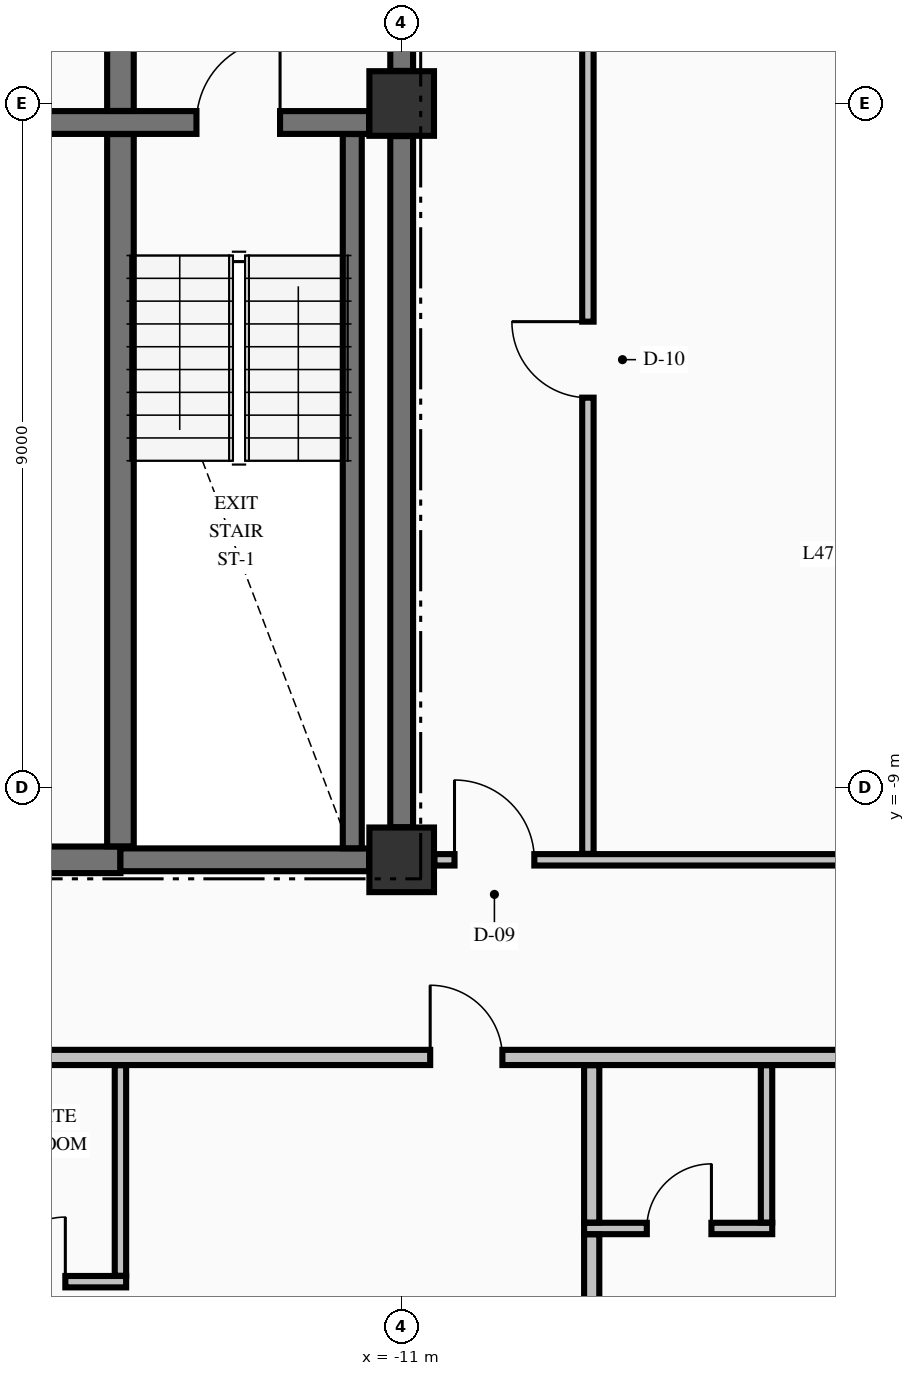
"""IFC4 building model, lengths in metres.
Left out: names, types, materials, properties, quantities, classifications, styles, units other than length and angle.
Written with IfcOpenShell. Run it as: python <this file> out.ifc"""

import sys

from ifc_helpers import new_model, si_unit, direction, frame, frame_2d, origin, origin_2d, place, context, subcontext, project, spatial, rectangle, extrude, element, fill, save


model = new_model("IFC4")
c1 = context("Model", 3, precision=1e-05, world=origin(), true_north=direction((0.0, 1.0)))
c2 = subcontext(c1, "Body", "Model", "MODEL_VIEW")
j1 = project(units=[si_unit("LENGTHUNIT", "METRE"), si_unit("PLANEANGLEUNIT", "RADIAN")], contexts=[c1])
p1 = place(None, origin())
s1 = spatial("IfcSite", under=j1, at=p1, CompositionType="ELEMENT")
p2 = place(p1, origin())
s2 = spatial("IfcBuilding", under=s1, at=p2, CompositionType="ELEMENT")
p3 = place(p2, frame((0.0, 0.0, 183.06)))
s3 = spatial("IfcBuildingStorey", under=s2, at=p3, CompositionType="ELEMENT", Elevation=183.06)
for number, where, z_axis, x_axis in (
    (1, (-11.0, -9.95, -0.25), (0.0, 0.0, 1.0), (1.0, 0.0, 0.0)),
    (2, (-11.0, 0.0, -0.25), (0.0, 0.0, 1.0), (1.0, 0.0, 0.0)),
):
    element("IfcColumn", number, at=place(p3, frame(where, z_axis=z_axis, x_axis=x_axis)), inside=s3, PredefinedType="COLUMN", context=c2, shape_type="SweptSolid", body=[
        extrude(rectangle(XDim=0.85, YDim=0.85, at=origin_2d()), origin(), (0.0, 0.0, 1.0), 3.225),
    ])
p4 = place(p3, frame((-19.571, -9.95, 0.0), z_axis=(0.0, 0.0, 1.0), x_axis=(1.0, 0.0, 0.0)))
e3 = element("IfcWall", 3, at=p4, inside=s3, PredefinedType="SHEAR", context=c2, shape_type="SweptSolid", body=[
    extrude(rectangle(XDim=4.871, YDim=0.35, at=frame_2d((2.436, 0.0))), origin(), (0.0, 0.0, 1.0), 2.975),
])
p5 = place(p4, frame((0.746, 0.0, 0.0)))
e4 = element("IfcOpeningElement", 4, at=p5, cuts=e3, PredefinedType="OPENING", context=c2, shape_type="SweptSolid", body=[
    extrude(rectangle(XDim=1.05, YDim=2.15, at=frame_2d((0.525, 1.075))), frame((0.0, 0.185, 0.0), z_axis=(0.0, -1.0, 0.0), x_axis=(1.0, 0.0, 0.0)), (0.0, 0.0, 1.0), 0.37),
])
p6 = place(p3, frame((-14.7, -9.95, 0.0), z_axis=(0.0, 0.0, 1.0), x_axis=(1.0, 0.0, 0.0)))
e5 = element("IfcWall", 5, at=p6, inside=s3, PredefinedType="SHEAR", context=c2, shape_type="SweptSolid", body=[
    extrude(rectangle(XDim=3.271, YDim=0.3, at=frame_2d((1.635, 0.0))), origin(), (0.0, 0.0, 1.0), 2.975),
])
p7 = place(p3, frame((-19.571, -0.25, 0.0), z_axis=(0.0, 0.0, 1.0), x_axis=(1.0, 0.0, 0.0)))
e6 = element("IfcWall", 6, at=p7, inside=s3, PredefinedType="SHEAR", context=c2, shape_type="SweptSolid", body=[
    extrude(rectangle(XDim=8.142, YDim=0.3, at=frame_2d((4.071, 0.0))), origin(), (0.0, 0.0, 1.0), 2.975),
])
p8 = place(p7, frame((5.871, 0.0, 0.0)))
e7 = element("IfcOpeningElement", 7, at=p8, cuts=e6, PredefinedType="OPENING", context=c2, shape_type="SweptSolid", body=[
    extrude(rectangle(XDim=1.1, YDim=2.15, at=frame_2d((0.55, 1.075))), frame((0.0, 0.16, 0.0), z_axis=(0.0, -1.0, 0.0), x_axis=(1.0, 0.0, 0.0)), (0.0, 0.0, 1.0), 0.32),
])
p9 = place(p3, frame((-17.1, -15.5, 0.0), z_axis=(0.0, 0.0, 1.0), x_axis=(1.0, 0.0, 0.0)))
e8 = element("IfcWall", 8, at=p9, inside=s3, PredefinedType="PARTITIONING", context=c2, shape_type="SweptSolid", body=[
    extrude(rectangle(XDim=2.475, YDim=0.15, at=frame_2d((1.238, 0.0))), origin(), (0.0, 0.0, 1.0), 2.975),
])
p10 = place(p9, frame((0.825, 0.0, 0.0)))
e9 = element("IfcOpeningElement", 9, at=p10, cuts=e8, PredefinedType="OPENING", context=c2, shape_type="SweptSolid", body=[
    extrude(rectangle(XDim=0.85, YDim=2.1, at=frame_2d((0.425, 1.05))), frame((0.0, 0.085, 0.0), z_axis=(0.0, -1.0, 0.0), x_axis=(1.0, 0.0, 0.0)), (0.0, 0.0, 1.0), 0.17),
])
p11 = place(p3, frame((-8.6, -14.8, 0.0), z_axis=(0.0, 0.0, 1.0), x_axis=(1.0, 0.0, 0.0)))
e10 = element("IfcWall", 10, at=p11, inside=s3, PredefinedType="PARTITIONING", context=c2, shape_type="SweptSolid", body=[
    extrude(rectangle(XDim=2.475, YDim=0.15, at=frame_2d((1.238, 0.0))), origin(), (0.0, 0.0, 1.0), 2.975),
])
p12 = place(p11, frame((0.825, 0.0, 0.0)))
e11 = element("IfcOpeningElement", 11, at=p12, cuts=e10, PredefinedType="OPENING", context=c2, shape_type="SweptSolid", body=[
    extrude(rectangle(XDim=0.85, YDim=2.1, at=frame_2d((0.425, 1.05))), frame((0.0, 0.085, 0.0), z_axis=(0.0, -1.0, 0.0), x_axis=(1.0, 0.0, 0.0)), (0.0, 0.0, 1.0), 0.17),
])
p13 = place(p3, frame((-17.1, -12.55, 0.0), z_axis=(0.0, 0.0, 1.0), x_axis=(1.0, 0.0, 0.0)))
e12 = element("IfcWall", 12, at=p13, inside=s3, PredefinedType="PARTITIONING", context=c2, shape_type="SweptSolid", body=[
    extrude(rectangle(XDim=39.2, YDim=0.2, at=frame_2d((19.6, 0.0))), origin(), (0.0, 0.0, 1.0), 2.975),
])
p14 = place(p13, frame((6.475, 0.0, 0.0)))
e13 = element("IfcOpeningElement", 13, at=p14, cuts=e12, PredefinedType="OPENING", context=c2, shape_type="SweptSolid", body=[
    extrude(rectangle(XDim=0.95, YDim=2.15, at=frame_2d((0.475, 1.075))), frame((0.0, 0.11, 0.0), z_axis=(0.0, -1.0, 0.0), x_axis=(1.0, 0.0, 0.0)), (0.0, 0.0, 1.0), 0.22),
])
p15 = place(p13, frame((13.525, 0.0, 0.0)))
e14 = element("IfcOpeningElement", 14, at=p15, cuts=e12, PredefinedType="OPENING", context=c2, shape_type="SweptSolid", body=[
    extrude(rectangle(XDim=0.95, YDim=2.15, at=frame_2d((0.475, 1.075))), frame((0.0, 0.11, 0.0), z_axis=(0.0, -1.0, 0.0), x_axis=(1.0, 0.0, 0.0)), (0.0, 0.0, 1.0), 0.22),
])
p16 = place(p13, frame((23.275, 0.0, 0.0)))
e15 = element("IfcOpeningElement", 15, at=p16, cuts=e12, PredefinedType="OPENING", context=c2, shape_type="SweptSolid", body=[
    extrude(rectangle(XDim=0.95, YDim=2.15, at=frame_2d((0.475, 1.075))), frame((0.0, 0.11, 0.0), z_axis=(0.0, -1.0, 0.0), x_axis=(1.0, 0.0, 0.0)), (0.0, 0.0, 1.0), 0.22),
])
p17 = place(p13, frame((33.175, 0.0, 0.0)))
e16 = element("IfcOpeningElement", 16, at=p17, cuts=e12, PredefinedType="OPENING", context=c2, shape_type="SweptSolid", body=[
    extrude(rectangle(XDim=0.95, YDim=2.15, at=frame_2d((0.475, 1.075))), frame((0.0, 0.11, 0.0), z_axis=(0.0, -1.0, 0.0), x_axis=(1.0, 0.0, 0.0)), (0.0, 0.0, 1.0), 0.22),
])
p18 = place(p3, frame((-10.569, -9.95, 0.0), z_axis=(0.0, 0.0, 1.0), x_axis=(1.0, 0.0, 0.0)))
e17 = element("IfcWall", 17, at=p18, inside=s3, PredefinedType="PARTITIONING", context=c2, shape_type="SweptSolid", body=[
    extrude(rectangle(XDim=21.138, YDim=0.15, at=frame_2d((10.569, 0.0))), origin(), (0.0, 0.0, 1.0), 2.975),
])
p19 = place(p18, frame((0.264, 0.0, 0.0)))
e18 = element("IfcOpeningElement", 18, at=p19, cuts=e17, PredefinedType="OPENING", context=c2, shape_type="SweptSolid", body=[
    extrude(rectangle(XDim=1.05, YDim=2.15, at=frame_2d((0.525, 1.075))), frame((0.0, 0.085, 0.0), z_axis=(0.0, -1.0, 0.0), x_axis=(1.0, 0.0, 0.0)), (0.0, 0.0, 1.0), 0.17),
])
p20 = place(p18, frame((19.824, 0.0, 0.0)))
e19 = element("IfcOpeningElement", 19, at=p20, cuts=e17, PredefinedType="OPENING", context=c2, shape_type="SweptSolid", body=[
    extrude(rectangle(XDim=1.05, YDim=2.15, at=frame_2d((0.525, 1.075))), frame((0.0, 0.085, 0.0), z_axis=(0.0, -1.0, 0.0), x_axis=(1.0, 0.0, 0.0)), (0.0, 0.0, 1.0), 0.17),
])
p21 = place(p18, frame((12.874, 0.0, 0.0)))
e20 = element("IfcOpeningElement", 20, at=p21, cuts=e17, PredefinedType="OPENING", context=c2, shape_type="SweptSolid", body=[
    extrude(rectangle(XDim=0.95, YDim=2.15, at=frame_2d((0.475, 1.075))), frame((0.0, 0.085, 0.0), z_axis=(0.0, -1.0, 0.0), x_axis=(1.0, 0.0, 0.0)), (0.0, 0.0, 1.0), 0.17),
])
p22 = place(p3, frame((-14.7, -9.773, 0.0), z_axis=(0.0, 0.0, 1.0), x_axis=(0.0, 1.0, 0.0)))
e21 = element("IfcWall", 21, at=p22, inside=s3, PredefinedType="SHEAR", context=c2, shape_type="SweptSolid", body=[
    extrude(rectangle(XDim=9.371, YDim=0.35, at=frame_2d((4.686, 0.0))), origin(), (0.0, 0.0, 1.0), 2.975),
])
p23 = place(p3, frame((-14.7, -0.098, 0.0), z_axis=(0.0, 0.0, 1.0), x_axis=(0.0, 1.0, 0.0)))
e22 = element("IfcWall", 22, at=p23, inside=s3, PredefinedType="SHEAR", context=c2, shape_type="SweptSolid", body=[
    extrude(rectangle(XDim=2.846, YDim=0.35, at=frame_2d((1.423, 0.0))), origin(), (0.0, 0.0, 1.0), 2.975),
])
p24 = place(p3, frame((-11.65, -9.798, 0.0), z_axis=(0.0, 0.0, 1.0), x_axis=(0.0, 1.0, 0.0)))
e23 = element("IfcWall", 23, at=p24, inside=s3, PredefinedType="SOLIDWALL", context=c2, shape_type="SweptSolid", body=[
    extrude(rectangle(XDim=9.396, YDim=0.25, at=frame_2d((4.698, 0.0))), origin(), (0.0, 0.0, 1.0), 2.975),
])
p25 = place(p3, frame((-11.0, -9.521, 0.0), z_axis=(0.0, 0.0, 1.0), x_axis=(0.0, 1.0, 0.0)))
e24 = element("IfcWall", 24, at=p25, inside=s3, PredefinedType="SHEAR", context=c2, shape_type="SweptSolid", body=[
    extrude(rectangle(XDim=9.092, YDim=0.3, at=frame_2d((4.546, 0.0))), origin(), (0.0, 0.0, 1.0), 2.975),
])
p26 = place(p3, frame((-11.0, 0.429, 0.0), z_axis=(0.0, 0.0, 1.0), x_axis=(0.0, 1.0, 0.0)))
e25 = element("IfcWall", 25, at=p26, inside=s3, PredefinedType="SHEAR", context=c2, shape_type="SweptSolid", body=[
    extrude(rectangle(XDim=2.319, YDim=0.3, at=frame_2d((1.16, 0.0))), origin(), (0.0, 0.0, 1.0), 2.975),
])
p27 = place(p26, frame((0.671, 0.0, 0.0)))
e26 = element("IfcOpeningElement", 26, at=p27, cuts=e25, PredefinedType="OPENING", context=c2, shape_type="SweptSolid", body=[
    extrude(rectangle(XDim=1.1, YDim=2.15, at=frame_2d((0.55, 1.075))), frame((0.0, 0.16, 0.0), z_axis=(0.0, -1.0, 0.0), x_axis=(1.0, 0.0, 0.0)), (0.0, 0.0, 1.0), 0.32),
])
p28 = place(p3, frame((-14.7, -15.422, 0.0), z_axis=(0.0, 0.0, 1.0), x_axis=(0.0, 1.0, 0.0)))
e27 = element("IfcWall", 27, at=p28, inside=s3, PredefinedType="PARTITIONING", context=c2, shape_type="SweptSolid", body=[
    extrude(rectangle(XDim=2.769, YDim=0.15, at=frame_2d((1.385, 0.0))), origin(), (0.0, 0.0, 1.0), 2.975),
])
p29 = place(p3, frame((-8.55, -9.872, 0.0), z_axis=(0.0, 0.0, 1.0), x_axis=(0.0, 1.0, 0.0)))
e28 = element("IfcWall", 28, at=p29, inside=s3, PredefinedType="PARTITIONING", context=c2, shape_type="SweptSolid", body=[
    extrude(rectangle(XDim=12.969, YDim=0.15, at=frame_2d((6.484, 0.0))), origin(), (0.0, 0.0, 1.0), 2.975),
])
p30 = place(p29, frame((6.002, 0.0, 0.0)))
e29 = element("IfcOpeningElement", 29, at=p30, cuts=e28, PredefinedType="OPENING", context=c2, shape_type="SweptSolid", body=[
    extrude(rectangle(XDim=1.0, YDim=2.15, at=frame_2d((0.5, 1.075))), frame((0.0, 0.085, 0.0), z_axis=(0.0, -1.0, 0.0), x_axis=(1.0, 0.0, 0.0)), (0.0, 0.0, 1.0), 0.17),
])
p31 = place(p3, frame((-8.5, -24.335, 0.0), z_axis=(0.0, 0.0, 1.0), x_axis=(0.0, 1.0, 0.0)))
e30 = element("IfcWall", 30, at=p31, inside=s3, PredefinedType="PARTITIONING", context=c2, shape_type="SweptSolid", body=[
    extrude(rectangle(XDim=9.457, YDim=0.2, at=frame_2d((4.729, 0.0))), origin(), (0.0, 0.0, 1.0), 2.975),
])
p32 = place(p3, frame((-8.5, -14.722, 0.0), z_axis=(0.0, 0.0, 1.0), x_axis=(0.0, 1.0, 0.0)))
e31 = element("IfcWall", 31, at=p32, inside=s3, PredefinedType="PARTITIONING", context=c2, shape_type="SweptSolid", body=[
    extrude(rectangle(XDim=2.069, YDim=0.2, at=frame_2d((1.034, 0.0))), origin(), (0.0, 0.0, 1.0), 2.975),
])
p33 = place(p3, frame((-6.2, -14.722, 0.0), z_axis=(0.0, 0.0, 1.0), x_axis=(0.0, 1.0, 0.0)))
e32 = element("IfcWall", 32, at=p33, inside=s3, PredefinedType="PARTITIONING", context=c2, shape_type="SweptSolid", body=[
    extrude(rectangle(XDim=2.069, YDim=0.15, at=frame_2d((1.034, 0.0))), origin(), (0.0, 0.0, 1.0), 2.975),
])
p34 = place(p8, origin())
e33 = element("IfcDoor", 33, at=p34, inside=s3, OperationType="SINGLE_SWING_RIGHT", PredefinedType="DOOR", context=c2, shape_type="SweptSolid", body=[
    extrude(rectangle(XDim=1.1, YDim=2.15, at=frame_2d((0.55, 1.075))), frame((0.0, 0.025, 0.0), z_axis=(0.0, -1.0, 0.0), x_axis=(1.0, 0.0, 0.0)), (0.0, 0.0, 1.0), 0.05),
])
fill(e7, e33)
p35 = place(p19, origin())
e34 = element("IfcDoor", 34, at=p35, inside=s3, OperationType="SINGLE_SWING_LEFT", PredefinedType="DOOR", context=c2, shape_type="SweptSolid", body=[
    extrude(rectangle(XDim=1.05, YDim=2.15, at=frame_2d((0.525, 1.075))), frame((0.0, 0.025, 0.0), z_axis=(0.0, -1.0, 0.0), x_axis=(1.0, 0.0, 0.0)), (0.0, 0.0, 1.0), 0.05),
])
fill(e18, e34)
p36 = place(p14, origin())
e35 = element("IfcDoor", 35, at=p36, inside=s3, OperationType="SINGLE_SWING_LEFT", PredefinedType="DOOR", context=c2, shape_type="SweptSolid", body=[
    extrude(rectangle(XDim=0.95, YDim=2.15, at=frame_2d((0.475, 1.075))), frame((0.0, 0.025, 0.0), z_axis=(0.0, -1.0, 0.0), x_axis=(1.0, 0.0, 0.0)), (0.0, 0.0, 1.0), 0.05),
])
fill(e13, e35)
p37 = place(p10, origin())
e36 = element("IfcDoor", 36, at=p37, inside=s3, OperationType="SINGLE_SWING_RIGHT", PredefinedType="DOOR", context=c2, shape_type="SweptSolid", body=[
    extrude(rectangle(XDim=0.85, YDim=2.1, at=frame_2d((0.425, 1.05))), frame((0.0, 0.025, 0.0), z_axis=(0.0, -1.0, 0.0), x_axis=(1.0, 0.0, 0.0)), (0.0, 0.0, 1.0), 0.05),
])
fill(e9, e36)
p38 = place(p12, origin())
e37 = element("IfcDoor", 37, at=p38, inside=s3, OperationType="SINGLE_SWING_RIGHT", PredefinedType="DOOR", context=c2, shape_type="SweptSolid", body=[
    extrude(rectangle(XDim=0.85, YDim=2.1, at=frame_2d((0.425, 1.05))), frame((0.0, 0.025, 0.0), z_axis=(0.0, -1.0, 0.0), x_axis=(1.0, 0.0, 0.0)), (0.0, 0.0, 1.0), 0.05),
])
fill(e11, e37)
p39 = place(p30, origin())
e38 = element("IfcDoor", 38, at=p39, inside=s3, OperationType="SINGLE_SWING_RIGHT", PredefinedType="DOOR", context=c2, shape_type="SweptSolid", body=[
    extrude(rectangle(XDim=1.0, YDim=2.15, at=frame_2d((0.5, 1.075))), frame((0.0, 0.025, 0.0), z_axis=(0.0, -1.0, 0.0), x_axis=(1.0, 0.0, 0.0)), (0.0, 0.0, 1.0), 0.05),
])
fill(e29, e38)
save(model, sys.argv[1])
